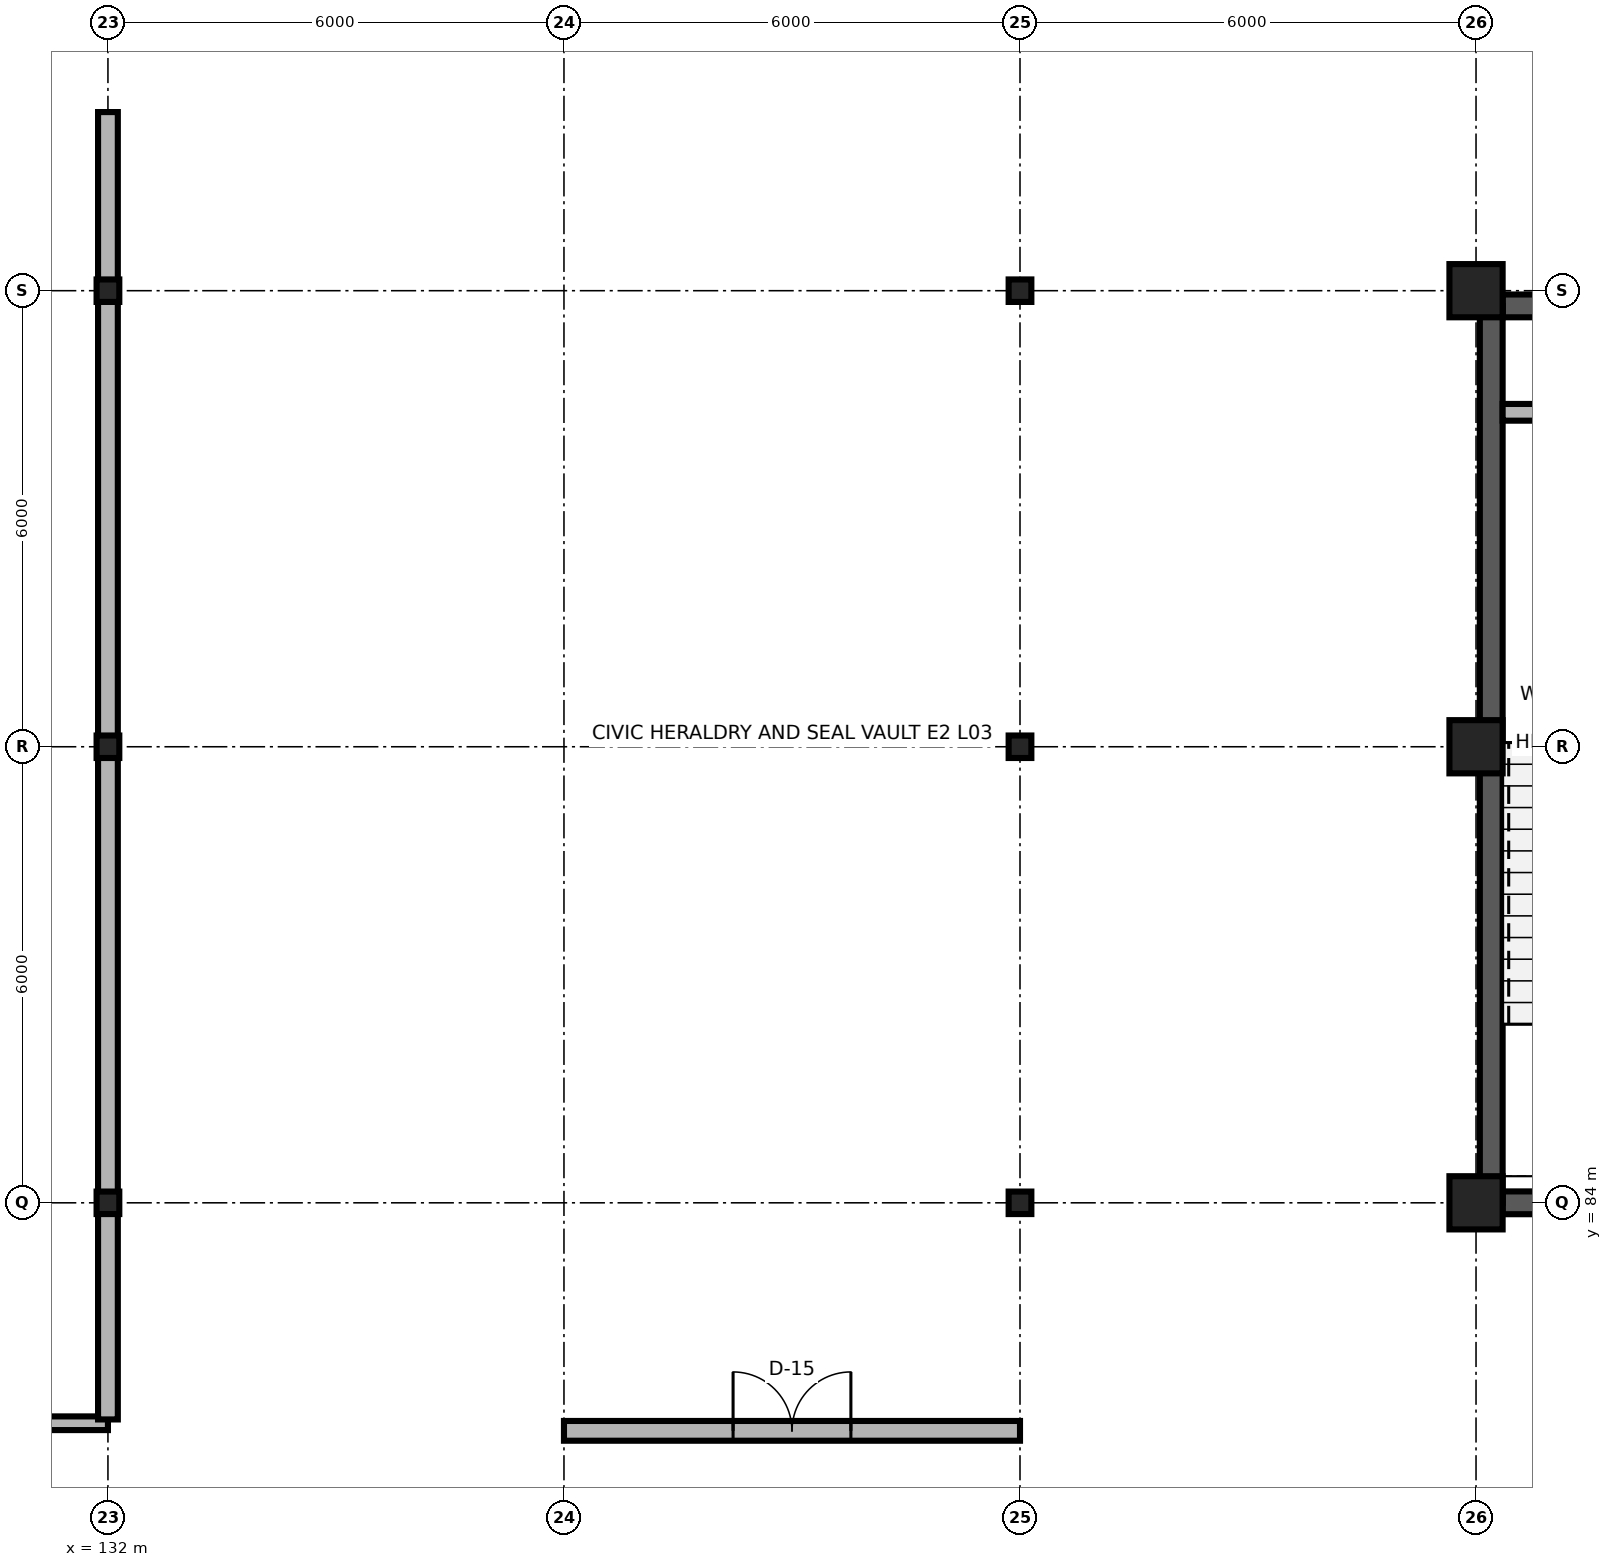
"""IFC4 building model, lengths in metres.
Left out: names, types, materials, properties, quantities, classifications, styles, units other than length and angle.
Written with IfcOpenShell. Run it as: python <this file> out.ifc"""

import sys

from ifc_helpers import new_model, si_unit, direction, frame, frame_2d, origin, origin_2d, place, context, subcontext, project, spatial, rectangle, i_section, extrude, element, fill, save


model = new_model("IFC4")
c1 = context("Model", 3, precision=1e-05, world=origin(), true_north=direction((0.0, 1.0)))
c2 = subcontext(c1, "Body", "Model", "MODEL_VIEW")
j1 = project(units=[si_unit("LENGTHUNIT", "METRE"), si_unit("PLANEANGLEUNIT", "RADIAN")], contexts=[c1])
p1 = place(None, origin())
s1 = spatial("IfcSite", under=j1, at=p1, CompositionType="ELEMENT")
p2 = place(p1, origin())
s2 = spatial("IfcBuilding", under=s1, at=p2, CompositionType="ELEMENT")
p3 = place(p2, frame((0.0, 0.0, 12.0)))
s3 = spatial("IfcBuildingStorey", under=s2, at=p3, CompositionType="ELEMENT", Elevation=12.0)
for number, where, z_axis, x_axis in (
    (1, (132.0, 84.0, 0.0), (0.0, 0.0, 1.0), (1.0, 0.0, 0.0)),
    (2, (144.0, 84.0, 0.0), (0.0, 0.0, 1.0), (1.0, 0.0, 0.0)),
):
    element("IfcColumn", number, at=place(p3, frame(where, z_axis=z_axis, x_axis=x_axis)), inside=s3, PredefinedType="COLUMN", context=c2, shape_type="SweptSolid", body=[
        extrude(i_section(OverallWidth=0.299, OverallDepth=0.296, WebThickness=0.009, FlangeThickness=0.014, FilletRadius=0.018, at=origin_2d()), origin(), (0.0, 0.0, 1.0), 4.5),
    ])
p4 = place(p3, frame((150.0, 84.0, 0.0), z_axis=(0.0, 0.0, 1.0), x_axis=(1.0, 0.0, 0.0)))
e3 = element("IfcColumn", 3, at=p4, inside=s3, PredefinedType="COLUMN", context=c2, shape_type="SweptSolid", body=[
    extrude(rectangle(XDim=0.7, YDim=0.7, at=origin_2d()), origin(), (0.0, 0.0, 1.0), 4.5),
])
for number, where, z_axis, x_axis in (
    (4, (132.0, 90.0, 0.0), (0.0, 0.0, 1.0), (1.0, 0.0, 0.0)),
    (5, (144.0, 90.0, 0.0), (0.0, 0.0, 1.0), (1.0, 0.0, 0.0)),
):
    element("IfcColumn", number, at=place(p3, frame(where, z_axis=z_axis, x_axis=x_axis)), inside=s3, PredefinedType="COLUMN", context=c2, shape_type="SweptSolid", body=[
        extrude(i_section(OverallWidth=0.299, OverallDepth=0.296, WebThickness=0.009, FlangeThickness=0.014, FilletRadius=0.018, at=origin_2d()), origin(), (0.0, 0.0, 1.0), 4.5),
    ])
p5 = place(p3, frame((150.0, 90.0, 0.0), z_axis=(0.0, 0.0, 1.0), x_axis=(1.0, 0.0, 0.0)))
e6 = element("IfcColumn", 6, at=p5, inside=s3, PredefinedType="COLUMN", context=c2, shape_type="SweptSolid", body=[
    extrude(rectangle(XDim=0.7, YDim=0.7, at=origin_2d()), origin(), (0.0, 0.0, 1.0), 4.5),
])
for number, where, z_axis, x_axis in (
    (7, (132.0, 96.0, 0.0), (0.0, 0.0, 1.0), (1.0, 0.0, 0.0)),
    (8, (144.0, 96.0, 0.0), (0.0, 0.0, 1.0), (1.0, 0.0, 0.0)),
):
    element("IfcColumn", number, at=place(p3, frame(where, z_axis=z_axis, x_axis=x_axis)), inside=s3, PredefinedType="COLUMN", context=c2, shape_type="SweptSolid", body=[
        extrude(i_section(OverallWidth=0.299, OverallDepth=0.296, WebThickness=0.009, FlangeThickness=0.014, FilletRadius=0.018, at=origin_2d()), origin(), (0.0, 0.0, 1.0), 4.5),
    ])
p6 = place(p3, frame((150.0, 96.0, 0.0), z_axis=(0.0, 0.0, 1.0), x_axis=(1.0, 0.0, 0.0)))
e9 = element("IfcColumn", 9, at=p6, inside=s3, PredefinedType="COLUMN", context=c2, shape_type="SweptSolid", body=[
    extrude(rectangle(XDim=0.7, YDim=0.7, at=origin_2d()), origin(), (0.0, 0.0, 1.0), 4.5),
])
p7 = place(p3, frame((150.35, 84.0, 0.0), z_axis=(0.0, 0.0, 1.0), x_axis=(1.0, 0.0, 0.0)))
e10 = element("IfcWall", 10, at=p7, inside=s3, PredefinedType="SHEAR", context=c2, shape_type="SweptSolid", body=[
    extrude(rectangle(XDim=5.3, YDim=0.3, at=frame_2d((2.65, 0.0))), origin(), (0.0, 0.0, 1.0), 4.22),
])
p8 = place(p7, frame((1.925, 0.0, 0.0)))
e11 = element("IfcOpeningElement", 11, at=p8, cuts=e10, PredefinedType="OPENING", context=c2, shape_type="SweptSolid", body=[
    extrude(rectangle(XDim=1.45, YDim=2.25, at=frame_2d((0.725, 1.125))), frame((0.0, 0.165, 0.0), z_axis=(0.0, -1.0, 0.0), x_axis=(1.0, 0.0, 0.0)), (0.0, 0.0, 1.0), 0.33),
])
p9 = place(p3, frame((150.35, 95.8, 0.0), z_axis=(0.0, 0.0, 1.0), x_axis=(1.0, 0.0, 0.0)))
e12 = element("IfcWall", 12, at=p9, inside=s3, PredefinedType="SHEAR", context=c2, shape_type="SweptSolid", body=[
    extrude(rectangle(XDim=5.3, YDim=0.3, at=frame_2d((2.65, 0.0))), origin(), (0.0, 0.0, 1.0), 4.22),
])
p10 = place(p3, frame((150.2, 84.0, 0.0), z_axis=(0.0, 0.0, 1.0), x_axis=(0.0, 1.0, 0.0)))
e13 = element("IfcWall", 13, at=p10, inside=s3, PredefinedType="SHEAR", context=c2, shape_type="SweptSolid", body=[
    extrude(rectangle(XDim=11.8, YDim=0.3, at=frame_2d((5.9, 0.0))), origin(), (0.0, 0.0, 1.0), 4.22),
])
p11 = place(p3, frame((150.35, 94.4, 0.0), z_axis=(0.0, 0.0, 1.0), x_axis=(1.0, 0.0, 0.0)))
e14 = element("IfcWall", 14, at=p11, inside=s3, PredefinedType="PARTITIONING", context=c2, shape_type="SweptSolid", body=[
    extrude(rectangle(XDim=1.1, YDim=0.22, at=frame_2d((0.55, 0.0))), origin(), (0.0, 0.0, 1.0), 4.22),
])
p12 = place(p3, frame((120.0, 81.1, 0.0), z_axis=(0.0, 0.0, 1.0), x_axis=(1.0, 0.0, 0.0)))
e15 = element("IfcWall", 15, at=p12, inside=s3, PredefinedType="PARTITIONING", context=c2, shape_type="SweptSolid", body=[
    extrude(rectangle(XDim=12.0, YDim=0.18, at=frame_2d((6.0, 0.0))), origin(), (0.0, 0.0, 1.0), 4.22),
])
p13 = place(p12, frame((5.125, 0.0, 0.0)))
e16 = element("IfcOpeningElement", 16, at=p13, cuts=e15, PredefinedType="OPENING", context=c2, shape_type="SweptSolid", body=[
    extrude(rectangle(XDim=1.75, YDim=2.55, at=frame_2d((0.875, 1.275))), frame((0.0, 0.105, 0.0), z_axis=(0.0, -1.0, 0.0), x_axis=(1.0, 0.0, 0.0)), (0.0, 0.0, 1.0), 0.21),
])
p14 = place(p3, frame((138.0, 81.0, 0.0), z_axis=(0.0, 0.0, 1.0), x_axis=(1.0, 0.0, 0.0)))
e17 = element("IfcWall", 17, at=p14, inside=s3, PredefinedType="PARTITIONING", context=c2, shape_type="SweptSolid", body=[
    extrude(rectangle(XDim=6.0, YDim=0.26, at=frame_2d((3.0, 0.0))), origin(), (0.0, 0.0, 1.0), 4.22),
])
p15 = place(p14, frame((2.225, 0.0, 0.0)))
e18 = element("IfcOpeningElement", 18, at=p15, cuts=e17, PredefinedType="OPENING", context=c2, shape_type="SweptSolid", body=[
    extrude(rectangle(XDim=1.55, YDim=2.3, at=frame_2d((0.775, 1.15))), frame((0.0, 0.145, 0.0), z_axis=(0.0, -1.0, 0.0), x_axis=(1.0, 0.0, 0.0)), (0.0, 0.0, 1.0), 0.29),
])
p16 = place(p3, frame((132.0, 81.15, 0.0), z_axis=(0.0, 0.0, 1.0), x_axis=(0.0, 1.0, 0.0)))
e19 = element("IfcWall", 19, at=p16, inside=s3, PredefinedType="PARTITIONING", context=c2, shape_type="SweptSolid", body=[
    extrude(rectangle(XDim=17.2, YDim=0.26, at=frame_2d((8.6, 0.0))), origin(), (0.0, 0.0, 1.0), 3.738),
])
p17 = place(p15, origin())
e20 = element("IfcDoor", 20, at=p17, inside=s3, OperationType="DOUBLE_DOOR_SINGLE_SWING", PredefinedType="DOOR", context=c2, shape_type="SweptSolid", body=[
    extrude(rectangle(XDim=1.55, YDim=2.3, at=frame_2d((0.775, 1.15))), frame((0.0, 0.025, 0.0), z_axis=(0.0, -1.0, 0.0), x_axis=(1.0, 0.0, 0.0)), (0.0, 0.0, 1.0), 0.05),
])
fill(e18, e20)
save(model, sys.argv[1])
